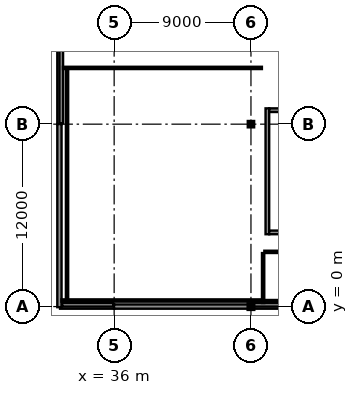
"""IFC4 building model, lengths in metres.
Left out: names, types, materials, properties, quantities, classifications, styles, units other than length and angle.
Written with IfcOpenShell. Run it as: python <this file> out.ifc"""

import sys

from ifc_helpers import new_model, si_unit, direction, frame, frame_2d, origin, origin_2d, place, context, subcontext, project, spatial, rectangle, i_section, extrude, element, fill, save


model = new_model("IFC4")
c1 = context("Model", 3, precision=1e-05, world=origin(), true_north=direction((0.0, 1.0)))
c2 = subcontext(c1, "Body", "Model", "MODEL_VIEW")
j1 = project(units=[si_unit("LENGTHUNIT", "METRE"), si_unit("PLANEANGLEUNIT", "RADIAN")], contexts=[c1])
p1 = place(None, origin())
s1 = spatial("IfcSite", under=j1, at=p1, CompositionType="ELEMENT")
p2 = place(p1, origin())
s2 = spatial("IfcBuilding", under=s1, at=p2, CompositionType="ELEMENT")
p3 = place(p2, frame((0.0, 0.0, 35.4)))
s3 = spatial("IfcBuildingStorey", under=s2, at=p3, CompositionType="ELEMENT", Elevation=35.4)
p4 = place(p3, frame((45.0, 0.0, 0.0), z_axis=(0.0, 0.0, 1.0), x_axis=(0.0, 1.0, 0.0)))
e1 = element("IfcColumn", 1, at=p4, inside=s3, PredefinedType="COLUMN", context=c2, shape_type="SweptSolid", body=[
    extrude(i_section(OverallWidth=0.28, OverallDepth=0.28, WebThickness=0.01, FlangeThickness=0.018, at=origin_2d()), origin(), (0.0, 0.0, 1.0), 3.8),
])
p5 = place(p3, frame((45.0, 12.0, 0.0), z_axis=(0.0, 0.0, 1.0), x_axis=(1.0, 0.0, 0.0)))
e2 = element("IfcColumn", 2, at=p5, inside=s3, PredefinedType="COLUMN", context=c2, shape_type="SweptSolid", body=[
    extrude(i_section(OverallWidth=0.26, OverallDepth=0.26, WebThickness=0.01, FlangeThickness=0.018, at=origin_2d()), origin(), (0.0, 0.0, 1.0), 3.8),
])
p6 = place(p3, frame((32.44, 0.0, 0.0), z_axis=(0.0, 0.0, 1.0), x_axis=(1.0, 0.0, 0.0)))
e3 = element("IfcWall", 3, at=p6, inside=s3, PredefinedType="SOLIDWALL", context=c2, shape_type="SweptSolid", body=[
    extrude(rectangle(XDim=3.57, YDim=0.28, at=frame_2d((1.785, 0.0))), origin(), (0.0, 0.0, 1.0), 2.787),
])
p7 = place(p3, frame((35.99, 0.0, 0.0), z_axis=(0.0, 0.0, 1.0), x_axis=(1.0, 0.0, 0.0)))
e4 = element("IfcWall", 4, at=p7, inside=s3, PredefinedType="SOLIDWALL", context=c2, shape_type="SweptSolid", body=[
    extrude(rectangle(XDim=8.872, YDim=0.28, at=frame_2d((4.436, 0.0))), origin(), (0.0, 0.0, 1.0), 2.787),
])
p8 = place(p3, frame((45.138, 0.0, 0.0), z_axis=(0.0, 0.0, 1.0), x_axis=(1.0, 0.0, 0.0)))
e5 = element("IfcWall", 5, at=p8, inside=s3, PredefinedType="SOLIDWALL", context=c2, shape_type="SweptSolid", body=[
    extrude(rectangle(XDim=8.854, YDim=0.28, at=frame_2d((4.427, 0.0))), origin(), (0.0, 0.0, 1.0), 2.787),
])
p9 = place(p8, frame((2.006, 0.0, 1.05)))
e6 = element("IfcOpeningElement", 6, at=p9, cuts=e5, PredefinedType="OPENING", context=c2, shape_type="SweptSolid", body=[
    extrude(rectangle(XDim=1.3, YDim=1.3, at=frame_2d((0.65, 0.65))), frame((0.0, 0.155, 0.0), z_axis=(0.0, -1.0, 0.0), x_axis=(1.0, 0.0, 0.0)), (0.0, 0.0, 1.0), 0.31),
])
p10 = place(p8, frame((5.548, 0.0, 1.05)))
e7 = element("IfcOpeningElement", 7, at=p10, cuts=e5, PredefinedType="OPENING", context=c2, shape_type="SweptSolid", body=[
    extrude(rectangle(XDim=1.3, YDim=1.3, at=frame_2d((0.65, 0.65))), frame((0.0, 0.155, 0.0), z_axis=(0.0, -1.0, 0.0), x_axis=(1.0, 0.0, 0.0)), (0.0, 0.0, 1.0), 0.31),
])
p11 = place(p3, frame((32.4, 23.96, 0.0), z_axis=(0.0, 0.0, 1.0), x_axis=(0.0, -1.0, 0.0)))
e8 = element("IfcWall", 8, at=p11, inside=s3, PredefinedType="SOLIDWALL", context=c2, shape_type="SweptSolid", body=[
    extrude(rectangle(XDim=11.97, YDim=0.28, at=frame_2d((5.985, 0.0))), origin(), (0.0, 0.0, 1.0), 3.095),
])
p12 = place(p11, frame((2.941, 0.0, 1.05)))
e9 = element("IfcOpeningElement", 9, at=p12, cuts=e8, PredefinedType="OPENING", context=c2, shape_type="SweptSolid", body=[
    extrude(rectangle(XDim=1.3, YDim=1.3, at=frame_2d((0.65, 0.65))), frame((0.0, 0.155, 0.0), z_axis=(0.0, -1.0, 0.0), x_axis=(1.0, 0.0, 0.0)), (0.0, 0.0, 1.0), 0.31),
])
p13 = place(p11, frame((8.5, 0.0, 1.05)))
e10 = element("IfcOpeningElement", 10, at=p13, cuts=e8, PredefinedType="OPENING", context=c2, shape_type="SweptSolid", body=[
    extrude(rectangle(XDim=1.3, YDim=1.3, at=frame_2d((0.65, 0.65))), frame((0.0, 0.155, 0.0), z_axis=(0.0, -1.0, 0.0), x_axis=(1.0, 0.0, 0.0)), (0.0, 0.0, 1.0), 0.31),
])
p14 = place(p3, frame((32.4, 12.01, 0.0), z_axis=(0.0, 0.0, 1.0), x_axis=(0.0, -1.0, 0.0)))
e11 = element("IfcWall", 11, at=p14, inside=s3, PredefinedType="SOLIDWALL", context=c2, shape_type="SweptSolid", body=[
    extrude(rectangle(XDim=12.05, YDim=0.28, at=frame_2d((6.025, 0.0))), origin(), (0.0, 0.0, 1.0), 3.095),
])
p15 = place(p14, frame((2.965, 0.0, 1.05)))
e12 = element("IfcOpeningElement", 12, at=p15, cuts=e11, PredefinedType="OPENING", context=c2, shape_type="SweptSolid", body=[
    extrude(rectangle(XDim=1.3, YDim=1.3, at=frame_2d((0.65, 0.65))), frame((0.0, 0.155, 0.0), z_axis=(0.0, -1.0, 0.0), x_axis=(1.0, 0.0, 0.0)), (0.0, 0.0, 1.0), 0.31),
])
p16 = place(p14, frame((7.785, 0.0, 1.05)))
e13 = element("IfcOpeningElement", 13, at=p16, cuts=e11, PredefinedType="OPENING", context=c2, shape_type="SweptSolid", body=[
    extrude(rectangle(XDim=1.3, YDim=1.3, at=frame_2d((0.65, 0.65))), frame((0.0, 0.155, 0.0), z_axis=(0.0, -1.0, 0.0), x_axis=(1.0, 0.0, 0.0)), (0.0, 0.0, 1.0), 0.31),
])
p17 = place(p3, frame((32.58, 0.12, 3.8), z_axis=(0.0, 0.0, 1.0), x_axis=(1.0, 0.0, 0.0)))
e14 = element("IfcWall", 14, at=p17, inside=s3, PredefinedType="PARAPET", context=c2, shape_type="SweptSolid", body=[
    extrude(rectangle(XDim=3.36, YDim=0.24, at=frame_2d((1.68, 0.0))), origin(), (0.0, 0.0, 1.0), 1.1),
])
p18 = place(p3, frame((45.06, 0.12, 3.8), z_axis=(0.0, 0.0, 1.0), x_axis=(1.0, 0.0, 0.0)))
e15 = element("IfcWall", 15, at=p18, inside=s3, PredefinedType="PARAPET", context=c2, shape_type="SweptSolid", body=[
    extrude(rectangle(XDim=8.88, YDim=0.24, at=frame_2d((4.44, 0.0))), origin(), (0.0, 0.0, 1.0), 1.1),
])
p19 = place(p3, frame((32.52, 23.58, 3.8), z_axis=(0.0, 0.0, 1.0), x_axis=(0.0, -1.0, 0.0)))
e16 = element("IfcWall", 16, at=p19, inside=s3, PredefinedType="PARAPET", context=c2, shape_type="SweptSolid", body=[
    extrude(rectangle(XDim=11.52, YDim=0.24, at=frame_2d((5.76, 0.0))), origin(), (0.0, 0.0, 1.0), 1.1),
])
p20 = place(p3, frame((46.08, 4.76, 0.0), z_axis=(0.0, 0.0, 1.0), x_axis=(0.0, 1.0, 0.0)))
e17 = element("IfcWall", 17, at=p20, inside=s3, PredefinedType="SHEAR", context=c2, shape_type="SweptSolid", body=[
    extrude(rectangle(XDim=8.28, YDim=0.24, at=frame_2d((4.14, 0.0))), origin(), (0.0, 0.0, 1.0), 3.81),
])
for number, where, z_axis, x_axis in (
    (18, (46.2, 4.88, 0.0), (0.0, 0.0, 1.0), (1.0, 0.0, 0.0)),
    (19, (46.2, 12.92, 0.0), (0.0, 0.0, 1.0), (1.0, 0.0, 0.0)),
):
    element("IfcWall", number, at=place(p3, frame(where, z_axis=z_axis, x_axis=x_axis)), inside=s3, PredefinedType="SHEAR", context=c2, shape_type="SweptSolid", body=[
        extrude(rectangle(XDim=3.7, YDim=0.24, at=frame_2d((1.85, 0.0))), origin(), (0.0, 0.0, 1.0), 3.81),
    ])
p21 = place(p3, frame((71.92, 0.36, 0.0), z_axis=(0.0, 0.0, 1.0), x_axis=(-1.0, 0.0, 0.0)))
e20 = element("IfcWall", 20, at=p21, inside=s3, PredefinedType="PARTITIONING", context=c2, shape_type="SweptSolid", body=[
    extrude(rectangle(XDim=26.04, YDim=0.15, at=frame_2d((13.02, 0.0))), origin(), (0.0, 0.0, 1.0), 3.64),
])
p22 = place(p3, frame((45.8, 0.235, 0.0), z_axis=(0.0, 0.0, 1.0), x_axis=(0.0, 1.0, 0.0)))
e21 = element("IfcWall", 21, at=p22, inside=s3, PredefinedType="PARTITIONING", context=c2, shape_type="SweptSolid", body=[
    extrude(rectangle(XDim=3.285, YDim=0.15, at=frame_2d((1.643, 0.0))), origin(), (0.0, 0.0, 1.0), 3.64),
])
p23 = place(p3, frame((45.88, 3.6, 0.0), z_axis=(0.0, 0.0, 1.0), x_axis=(1.0, 0.0, 0.0)))
e22 = element("IfcWall", 22, at=p23, inside=s3, PredefinedType="PARTITIONING", context=c2, shape_type="SweptSolid", body=[
    extrude(rectangle(XDim=58.24, YDim=0.15, at=frame_2d((29.12, 0.0))), origin(), (0.0, 0.0, 1.0), 3.64),
])
p24 = place(p23, frame((27.795, 0.0, 0.0)))
e23 = element("IfcOpeningElement", 23, at=p24, cuts=e22, PredefinedType="OPENING", context=c2, shape_type="SweptSolid", body=[
    extrude(rectangle(XDim=1.05, YDim=2.25, at=frame_2d((0.525, 1.125))), frame((0.0, 0.09, 0.0), z_axis=(0.0, -1.0, 0.0), x_axis=(1.0, 0.0, 0.0)), (0.0, 0.0, 1.0), 0.18),
])
p25 = place(p3, frame((45.73, 0.4, 0.0), z_axis=(0.0, 0.0, 1.0), x_axis=(-1.0, 0.0, 0.0)))
e24 = element("IfcWall", 24, at=p25, inside=s3, PredefinedType="PARTITIONING", context=c2, shape_type="SweptSolid", body=[
    extrude(rectangle(XDim=13.195, YDim=0.15, at=frame_2d((6.598, 0.0))), origin(), (0.0, 0.0, 1.0), 3.64),
])
p26 = place(p3, frame((32.9, 0.47, 0.0), z_axis=(0.0, 0.0, 1.0), x_axis=(0.0, 1.0, 0.0)))
e25 = element("IfcWall", 25, at=p26, inside=s3, PredefinedType="PARTITIONING", context=c2, shape_type="SweptSolid", body=[
    extrude(rectangle(XDim=15.15, YDim=0.15, at=frame_2d((7.575, 0.0))), origin(), (0.0, 0.0, 1.0), 3.64),
])
p27 = place(p3, frame((32.635, 15.7, 0.0), z_axis=(0.0, 0.0, 1.0), x_axis=(1.0, 0.0, 0.0)))
e26 = element("IfcWall", 26, at=p27, inside=s3, PredefinedType="PARTITIONING", context=c2, shape_type="SweptSolid", body=[
    extrude(rectangle(XDim=13.085, YDim=0.15, at=frame_2d((6.542, 0.0))), origin(), (0.0, 0.0, 1.0), 3.64),
])
p28 = place(p27, frame((6.017, 0.0, 0.0)))
e27 = element("IfcOpeningElement", 27, at=p28, cuts=e26, PredefinedType="OPENING", context=c2, shape_type="SweptSolid", body=[
    extrude(rectangle(XDim=1.05, YDim=2.25, at=frame_2d((0.525, 1.125))), frame((0.0, 0.09, 0.0), z_axis=(0.0, -1.0, 0.0), x_axis=(1.0, 0.0, 0.0)), (0.0, 0.0, 1.0), 0.18),
])
p29 = place(p13, origin())
e28 = element("IfcWindow", 28, at=p29, inside=s3, PartitioningType="SINGLE_PANEL", PredefinedType="WINDOW", context=c2, shape_type="SweptSolid", body=[
    extrude(rectangle(XDim=1.3, YDim=1.3, at=frame_2d((0.65, 0.65))), frame((0.0, 0.03, 0.0), z_axis=(0.0, -1.0, 0.0), x_axis=(1.0, 0.0, 0.0)), (0.0, 0.0, 1.0), 0.06),
])
fill(e10, e28)
p30 = place(p15, origin())
e29 = element("IfcWindow", 29, at=p30, inside=s3, PartitioningType="SINGLE_PANEL", PredefinedType="WINDOW", context=c2, shape_type="SweptSolid", body=[
    extrude(rectangle(XDim=1.3, YDim=1.3, at=frame_2d((0.65, 0.65))), frame((0.0, 0.03, 0.0), z_axis=(0.0, -1.0, 0.0), x_axis=(1.0, 0.0, 0.0)), (0.0, 0.0, 1.0), 0.06),
])
fill(e12, e29)
p31 = place(p16, origin())
e30 = element("IfcWindow", 30, at=p31, inside=s3, PartitioningType="SINGLE_PANEL", PredefinedType="WINDOW", context=c2, shape_type="SweptSolid", body=[
    extrude(rectangle(XDim=1.3, YDim=1.3, at=frame_2d((0.65, 0.65))), frame((0.0, 0.03, 0.0), z_axis=(0.0, -1.0, 0.0), x_axis=(1.0, 0.0, 0.0)), (0.0, 0.0, 1.0), 0.06),
])
fill(e13, e30)
p32 = place(p28, frame((1.05, 0.0, 0.0), z_axis=(0.0, 0.0, 1.0), x_axis=(-1.0, 0.0, 0.0)))
e31 = element("IfcDoor", 31, at=p32, inside=s3, OperationType="SINGLE_SWING_RIGHT", PredefinedType="DOOR", context=c2, shape_type="SweptSolid", body=[
    extrude(rectangle(XDim=1.05, YDim=2.25, at=frame_2d((0.525, 1.125))), frame((0.0, 0.025, 0.0), z_axis=(0.0, -1.0, 0.0), x_axis=(1.0, 0.0, 0.0)), (0.0, 0.0, 1.0), 0.05),
])
fill(e27, e31)
save(model, sys.argv[1])
